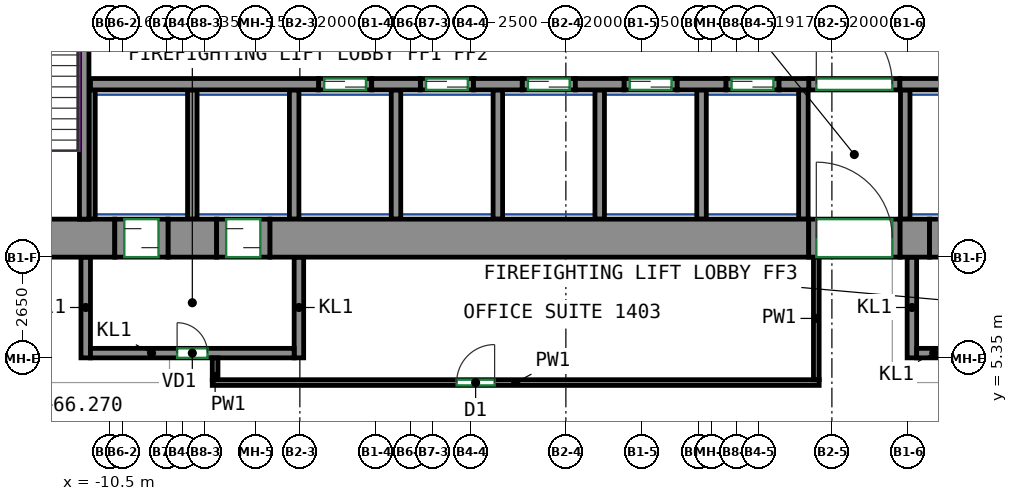
"""IFC4 building model, lengths in metres.
Left out: names, types, materials, properties, quantities, classifications, styles, units other than length and angle.
Written with IfcOpenShell. Run it as: python <this file> out.ifc"""

import sys

from ifc_helpers import new_model, si_unit, direction, frame, frame_2d, origin, place, context, subcontext, project, spatial, rectangle, extrude, source, transform, mapped, element, fill, save


model = new_model("IFC4")
c1 = context("Model", 3, precision=1e-05, world=origin(), true_north=direction((0.0, 1.0)))
c2 = subcontext(c1, "Body", "Model", "MODEL_VIEW")
j1 = project(units=[si_unit("LENGTHUNIT", "METRE"), si_unit("PLANEANGLEUNIT", "RADIAN")], contexts=[c1])
p1 = place(None, origin())
s1 = spatial("IfcSite", under=j1, at=p1, CompositionType="ELEMENT")
p2 = place(p1, origin())
s2 = spatial("IfcBuilding", under=s1, at=p2, CompositionType="ELEMENT")
p3 = place(p2, frame((0.0, 0.0, 63.2)))
s3 = spatial("IfcBuildingStorey", under=s2, at=p3, CompositionType="ELEMENT", Elevation=63.2)
m1 = source(origin(), c2, "Body", "SweptSolid", [
    extrude(rectangle(XDim=5.63, YDim=1.0, at=frame_2d((2.815, 0.0))), origin(), (0.0, 0.0, 1.0), 3.72),
])
p4 = place(p3, frame((-16.0, 8.5, 0.0), z_axis=(0.0, 0.0, 1.0), x_axis=(1.0, 0.0, 0.0)))
e1 = element("IfcWall", 1, at=p4, inside=s3, PredefinedType="SHEAR", context=c2, shape_type="MappedRepresentation", body=[
    mapped(m1, transform((0.0, 0.0, 0.0))),
])
p5 = place(p4, frame((2.25, 0.0, 0.0)))
e2 = element("IfcOpeningElement", 2, at=p5, cuts=e1, PredefinedType="OPENING", context=c2, shape_type="SweptSolid", body=[
    extrude(rectangle(XDim=1.2, YDim=2.1, at=frame_2d((0.6, 1.05))), frame((0.0, 0.51, 0.0), z_axis=(0.0, -1.0, 0.0), x_axis=(1.0, 0.0, 0.0)), (0.0, 0.0, 1.0), 1.02),
])
m2 = source(origin(), c2, "Body", "SweptSolid", [
    extrude(rectangle(XDim=1.28, YDim=1.0, at=frame_2d((0.64, 0.0))), origin(), (0.0, 0.0, 1.0), 3.72),
])
p6 = place(p3, frame((-8.97, 8.5, 0.0), z_axis=(0.0, 0.0, 1.0), x_axis=(1.0, 0.0, 0.0)))
e3 = element("IfcWall", 3, at=p6, inside=s3, PredefinedType="SHEAR", context=c2, shape_type="MappedRepresentation", body=[
    mapped(m2, transform((0.0, 0.0, 0.0))),
])
m3 = source(origin(), c2, "Body", "SweptSolid", [
    extrude(rectangle(XDim=14.18, YDim=1.0, at=frame_2d((7.09, 0.0))), origin(), (0.0, 0.0, 1.0), 3.72),
])
p7 = place(p3, frame((-6.29, 8.5, 0.0), z_axis=(0.0, 0.0, 1.0), x_axis=(1.0, 0.0, 0.0)))
e4 = element("IfcWall", 4, at=p7, inside=s3, PredefinedType="SHEAR", context=c2, shape_type="MappedRepresentation", body=[
    mapped(m3, transform((0.0, 0.0, 0.0))),
])
m4 = source(origin(), c2, "Body", "SweptSolid", [
    extrude(rectangle(XDim=0.78, YDim=1.0, at=frame_2d((0.39, 0.0))), origin(), (0.0, 0.0, 1.0), 3.72),
])
p8 = place(p3, frame((10.29, 8.5, 0.0), z_axis=(0.0, 0.0, 1.0), x_axis=(1.0, 0.0, 0.0)))
e5 = element("IfcWall", 5, at=p8, inside=s3, PredefinedType="SHEAR", context=c2, shape_type="MappedRepresentation", body=[
    mapped(m4, transform((0.0, 0.0, 0.0))),
])
m5 = source(origin(), c2, "Body", "SweptSolid", [
    extrude(rectangle(XDim=7.75, YDim=0.25, at=frame_2d((3.875, 0.0))), origin(), (0.0, 0.0, 1.0), 3.72),
])
p9 = place(p3, frame((-11.175, 9.0, 0.0), z_axis=(0.0, 0.0, 1.0), x_axis=(0.0, 1.0, 0.0)))
e6 = element("IfcWall", 6, at=p9, inside=s3, PredefinedType="SHEAR", context=c2, shape_type="MappedRepresentation", body=[
    mapped(m5, transform((0.0, 0.0, 0.0))),
])
m6 = source(origin(), c2, "Body", "SweptSolid", [
    extrude(rectangle(XDim=6.0, YDim=0.3, at=frame_2d((3.0, 0.0))), origin(), (0.0, 0.0, 1.0), 3.72),
])
p10 = place(p3, frame((-11.01, 12.55, 0.0), z_axis=(0.0, 0.0, 1.0), x_axis=(1.0, 0.0, 0.0)))
e7 = element("IfcWall", 7, at=p10, inside=s3, PredefinedType="SHEAR", context=c2, shape_type="MappedRepresentation", body=[
    mapped(m6, transform((0.0, 0.0, 0.0))),
])
m7 = source(origin(), c2, "Body", "SweptSolid", [
    extrude(rectangle(XDim=1.28, YDim=0.3, at=frame_2d((0.64, 0.0))), origin(), (0.0, 0.0, 1.0), 3.72),
])
for number, where, z_axis, x_axis in (
    (8, (-3.61, 12.55, 0.0), (0.0, 0.0, 1.0), (1.0, 0.0, 0.0)),
    (9, (-0.93, 12.55, 0.0), (0.0, 0.0, 1.0), (1.0, 0.0, 0.0)),
    (10, (1.75, 12.55, 0.0), (0.0, 0.0, 1.0), (1.0, 0.0, 0.0)),
    (11, (4.43, 12.55, 0.0), (0.0, 0.0, 1.0), (1.0, 0.0, 0.0)),
):
    element("IfcWall", number, at=place(p3, frame(where, z_axis=z_axis, x_axis=x_axis)), inside=s3, PredefinedType="SHEAR", context=c2, shape_type="MappedRepresentation", body=[
        mapped(m7, transform((0.0, 0.0, 0.0))),
    ])
m8 = source(origin(), c2, "Body", "SweptSolid", [
    extrude(rectangle(XDim=0.78, YDim=0.3, at=frame_2d((0.39, 0.0))), origin(), (0.0, 0.0, 1.0), 3.72),
])
p11 = place(p3, frame((7.11, 12.55, 0.0), z_axis=(0.0, 0.0, 1.0), x_axis=(1.0, 0.0, 0.0)))
e12 = element("IfcWall", 12, at=p11, inside=s3, PredefinedType="SHEAR", context=c2, shape_type="MappedRepresentation", body=[
    mapped(m8, transform((0.0, 0.0, 0.0))),
])
m9 = source(origin(), c2, "Body", "SweptSolid", [
    extrude(rectangle(XDim=2.82, YDim=0.3, at=frame_2d((1.41, 0.0))), origin(), (0.0, 0.0, 1.0), 3.72),
])
p12 = place(p3, frame((10.29, 12.55, 0.0), z_axis=(0.0, 0.0, 1.0), x_axis=(1.0, 0.0, 0.0)))
e13 = element("IfcWall", 13, at=p12, inside=s3, PredefinedType="SHEAR", context=c2, shape_type="MappedRepresentation", body=[
    mapped(m9, transform((0.0, 0.0, 0.0))),
])
m10 = source(origin(), c2, "Body", "SweptSolid", [
    extrude(rectangle(XDim=1.4, YDim=0.3, at=frame_2d((0.7, 0.0))), origin(), (0.0, 0.0, 1.0), 3.72),
])
p13 = place(p3, frame((-5.01, 12.55, 0.0), z_axis=(0.0, 0.0, 1.0), x_axis=(1.0, 0.0, 0.0)))
e14 = element("IfcWall", 14, at=p13, inside=s3, PredefinedType="PARTITIONING", context=c2, shape_type="MappedRepresentation", body=[
    mapped(m10, transform((0.0, 0.0, 0.0))),
])
p14 = place(p13, frame((0.15, 0.0, 0.0)))
e15 = element("IfcOpeningElement", 15, at=p14, cuts=e14, PredefinedType="OPENING", context=c2, shape_type="SweptSolid", body=[
    extrude(rectangle(XDim=1.1, YDim=2.1, at=frame_2d((0.55, 1.05))), frame((0.0, 0.16, 0.0), z_axis=(0.0, -1.0, 0.0), x_axis=(1.0, 0.0, 0.0)), (0.0, 0.0, 1.0), 0.32),
])
m11 = source(origin(), c2, "Body", "SweptSolid", [
    extrude(rectangle(XDim=1.4, YDim=0.3, at=frame_2d((0.7, 0.0))), origin(), (0.0, 0.0, 1.0), 3.72),
])
p15 = place(p3, frame((-2.33, 12.55, 0.0), z_axis=(0.0, 0.0, 1.0), x_axis=(1.0, 0.0, 0.0)))
e16 = element("IfcWall", 16, at=p15, inside=s3, PredefinedType="PARTITIONING", context=c2, shape_type="MappedRepresentation", body=[
    mapped(m11, transform((0.0, 0.0, 0.0))),
])
p16 = place(p15, frame((0.15, 0.0, 0.0)))
e17 = element("IfcOpeningElement", 17, at=p16, cuts=e16, PredefinedType="OPENING", context=c2, shape_type="SweptSolid", body=[
    extrude(rectangle(XDim=1.1, YDim=2.1, at=frame_2d((0.55, 1.05))), frame((0.0, 0.16, 0.0), z_axis=(0.0, -1.0, 0.0), x_axis=(1.0, 0.0, 0.0)), (0.0, 0.0, 1.0), 0.32),
])
p17 = place(p3, frame((0.35, 12.55, 0.0), z_axis=(0.0, 0.0, 1.0), x_axis=(1.0, 0.0, 0.0)))
e18 = element("IfcWall", 18, at=p17, inside=s3, PredefinedType="PARTITIONING", context=c2, shape_type="MappedRepresentation", body=[
    mapped(m10, transform((0.0, 0.0, 0.0))),
])
p18 = place(p17, frame((0.15, 0.0, 0.0)))
e19 = element("IfcOpeningElement", 19, at=p18, cuts=e18, PredefinedType="OPENING", context=c2, shape_type="SweptSolid", body=[
    extrude(rectangle(XDim=1.1, YDim=2.1, at=frame_2d((0.55, 1.05))), frame((0.0, 0.16, 0.0), z_axis=(0.0, -1.0, 0.0), x_axis=(1.0, 0.0, 0.0)), (0.0, 0.0, 1.0), 0.32),
])
p19 = place(p3, frame((3.03, 12.55, 0.0), z_axis=(0.0, 0.0, 1.0), x_axis=(1.0, 0.0, 0.0)))
e20 = element("IfcWall", 20, at=p19, inside=s3, PredefinedType="PARTITIONING", context=c2, shape_type="MappedRepresentation", body=[
    mapped(m10, transform((0.0, 0.0, 0.0))),
])
p20 = place(p19, frame((0.15, 0.0, 0.0)))
e21 = element("IfcOpeningElement", 21, at=p20, cuts=e20, PredefinedType="OPENING", context=c2, shape_type="SweptSolid", body=[
    extrude(rectangle(XDim=1.1, YDim=2.1, at=frame_2d((0.55, 1.05))), frame((0.0, 0.16, 0.0), z_axis=(0.0, -1.0, 0.0), x_axis=(1.0, 0.0, 0.0)), (0.0, 0.0, 1.0), 0.32),
])
p21 = place(p3, frame((5.71, 12.55, 0.0), z_axis=(0.0, 0.0, 1.0), x_axis=(1.0, 0.0, 0.0)))
e22 = element("IfcWall", 22, at=p21, inside=s3, PredefinedType="PARTITIONING", context=c2, shape_type="MappedRepresentation", body=[
    mapped(m11, transform((0.0, 0.0, 0.0))),
])
p22 = place(p21, frame((0.15, 0.0, 0.0)))
e23 = element("IfcOpeningElement", 23, at=p22, cuts=e22, PredefinedType="OPENING", context=c2, shape_type="SweptSolid", body=[
    extrude(rectangle(XDim=1.1, YDim=2.1, at=frame_2d((0.55, 1.05))), frame((0.0, 0.16, 0.0), z_axis=(0.0, -1.0, 0.0), x_axis=(1.0, 0.0, 0.0)), (0.0, 0.0, 1.0), 0.32),
])
m12 = source(origin(), c2, "Body", "SweptSolid", [
    extrude(rectangle(XDim=2.4, YDim=0.3, at=frame_2d((1.2, 0.0))), origin(), (0.0, 0.0, 1.0), 3.72),
])
p23 = place(p3, frame((7.89, 12.55, 0.0), z_axis=(0.0, 0.0, 1.0), x_axis=(1.0, 0.0, 0.0)))
e24 = element("IfcWall", 24, at=p23, inside=s3, PredefinedType="PARTITIONING", context=c2, shape_type="MappedRepresentation", body=[
    mapped(m12, transform((0.0, 0.0, 0.0))),
])
p24 = place(p23, frame((0.2, 0.0, 0.0)))
e25 = element("IfcOpeningElement", 25, at=p24, cuts=e24, PredefinedType="OPENING", context=c2, shape_type="SweptSolid", body=[
    extrude(rectangle(XDim=2.0, YDim=2.1, at=frame_2d((1.0, 1.05))), frame((0.0, 0.16, 0.0), z_axis=(0.0, -1.0, 0.0), x_axis=(1.0, 0.0, 0.0)), (0.0, 0.0, 1.0), 0.32),
])
m13 = source(origin(), c2, "Body", "SweptSolid", [
    extrude(rectangle(XDim=2.65, YDim=0.25, at=frame_2d((1.325, 0.0))), origin(), (0.0, 0.0, 1.0), 3.72),
])
for number, where, z_axis, x_axis in (
    (26, (-11.135, 5.35, 0.0), (0.0, 0.0, 1.0), (0.0, 1.0, 0.0)),
    (27, (-5.525, 5.35, 0.0), (0.0, 0.0, 1.0), (0.0, 1.0, 0.0)),
):
    element("IfcWall", number, at=place(p3, frame(where, z_axis=z_axis, x_axis=x_axis)), inside=s3, PredefinedType="PARTITIONING", context=c2, shape_type="MappedRepresentation", body=[
        mapped(m13, transform((0.0, 0.0, 0.0))),
    ])
m14 = source(origin(), c2, "Body", "SweptSolid", [
    extrude(rectangle(XDim=5.36, YDim=0.25, at=frame_2d((2.68, 0.0))), origin(), (0.0, 0.0, 1.0), 3.72),
])
p25 = place(p3, frame((-11.01, 5.475, 0.0), z_axis=(0.0, 0.0, 1.0), x_axis=(1.0, 0.0, 0.0)))
e28 = element("IfcWall", 28, at=p25, inside=s3, PredefinedType="PARTITIONING", context=c2, shape_type="MappedRepresentation", body=[
    mapped(m14, transform((0.0, 0.0, 0.0))),
])
p26 = place(p25, frame((2.28, 0.0, 0.0)))
e29 = element("IfcOpeningElement", 29, at=p26, cuts=e28, PredefinedType="OPENING", context=c2, shape_type="SweptSolid", body=[
    extrude(rectangle(XDim=0.8, YDim=2.0, at=frame_2d((0.4, 1.0))), frame((0.0, 0.135, 0.0), z_axis=(0.0, -1.0, 0.0), x_axis=(1.0, 0.0, 0.0)), (0.0, 0.0, 1.0), 0.27),
])
p27 = place(p3, frame((10.605, 5.35, 0.0), z_axis=(0.0, 0.0, 1.0), x_axis=(0.0, 1.0, 0.0)))
e30 = element("IfcWall", 30, at=p27, inside=s3, PredefinedType="PARTITIONING", context=c2, shape_type="MappedRepresentation", body=[
    mapped(m13, transform((0.0, 0.0, 0.0))),
])
m15 = source(origin(), c2, "Body", "SweptSolid", [
    extrude(rectangle(XDim=3.0, YDim=0.25, at=frame_2d((1.5, 0.0))), origin(), (0.0, 0.0, 1.0), 3.72),
])
p28 = place(p3, frame((10.73, 5.475, 0.0), z_axis=(0.0, 0.0, 1.0), x_axis=(1.0, 0.0, 0.0)))
e31 = element("IfcWall", 31, at=p28, inside=s3, PredefinedType="PARTITIONING", context=c2, shape_type="MappedRepresentation", body=[
    mapped(m15, transform((0.0, 0.0, 0.0))),
])
p29 = place(p28, frame((1.1, 0.0, 0.0)))
e32 = element("IfcOpeningElement", 32, at=p29, cuts=e31, PredefinedType="OPENING", context=c2, shape_type="SweptSolid", body=[
    extrude(rectangle(XDim=0.8, YDim=2.0, at=frame_2d((0.4, 1.0))), frame((0.0, 0.135, 0.0), z_axis=(0.0, -1.0, 0.0), x_axis=(1.0, 0.0, 0.0)), (0.0, 0.0, 1.0), 0.27),
])
m16 = source(origin(), c2, "Body", "SweptSolid", [
    extrude(rectangle(XDim=3.4, YDim=0.25, at=frame_2d((1.7, 0.0))), origin(), (0.0, 0.0, 1.0), 3.72),
])
for number, where, z_axis, x_axis in (
    (33, (10.43, 9.0, 0.0), (0.0, 0.0, 1.0), (0.0, 1.0, 0.0)),
    (34, (2.39, 9.0, 0.0), (0.0, 0.0, 1.0), (0.0, 1.0, 0.0)),
    (35, (5.07, 9.0, 0.0), (0.0, 0.0, 1.0), (0.0, 1.0, 0.0)),
    (36, (7.75, 9.0, 0.0), (0.0, 0.0, 1.0), (0.0, 1.0, 0.0)),
    (37, (-0.29, 9.0, 0.0), (0.0, 0.0, 1.0), (0.0, 1.0, 0.0)),
):
    element("IfcWall", number, at=place(p3, frame(where, z_axis=z_axis, x_axis=x_axis)), inside=s3, PredefinedType="PARTITIONING", context=c2, shape_type="MappedRepresentation", body=[
        mapped(m16, transform((0.0, 0.0, 0.0))),
    ])
m17 = source(origin(), c2, "Body", "SweptSolid", [
    extrude(rectangle(XDim=3.4, YDim=0.165, at=frame_2d((1.7, 0.0))), origin(), (0.0, 0.0, 1.0), 3.72),
])
p30 = place(p3, frame((-10.968, 9.0, 0.0), z_axis=(0.0, 0.0, 1.0), x_axis=(0.0, 1.0, 0.0)))
e38 = element("IfcWall", 38, at=p30, inside=s3, PredefinedType="PARTITIONING", context=c2, shape_type="MappedRepresentation", body=[
    mapped(m17, transform((0.0, 0.0, 0.0))),
])
for number, where, z_axis, x_axis in (
    (39, (-2.97, 9.0, 0.0), (0.0, 0.0, 1.0), (0.0, 1.0, 0.0)),
    (40, (-5.65, 9.0, 0.0), (0.0, 0.0, 1.0), (0.0, 1.0, 0.0)),
    (41, (-8.33, 9.0, 0.0), (0.0, 0.0, 1.0), (0.0, 1.0, 0.0)),
):
    element("IfcWall", number, at=place(p3, frame(where, z_axis=z_axis, x_axis=x_axis)), inside=s3, PredefinedType="PARTITIONING", context=c2, shape_type="MappedRepresentation", body=[
        mapped(m16, transform((0.0, 0.0, 0.0))),
    ])
m18 = source(origin(), c2, "Body", "SweptSolid", [
    extrude(rectangle(XDim=1.4, YDim=1.0, at=frame_2d((0.7, 0.0))), origin(), (0.0, 0.0, 1.0), 2.7),
])
p31 = place(p3, frame((-10.37, 8.5, 0.0), z_axis=(0.0, 0.0, 1.0), x_axis=(1.0, 0.0, 0.0)))
e42 = element("IfcWall", 42, at=p31, inside=s3, PredefinedType="PARTITIONING", context=c2, shape_type="MappedRepresentation", body=[
    mapped(m18, transform((0.0, 0.0, 0.0))),
])
p32 = place(p31, frame((0.25, 0.0, 0.0)))
e43 = element("IfcOpeningElement", 43, at=p32, cuts=e42, PredefinedType="OPENING", context=c2, shape_type="SweptSolid", body=[
    extrude(rectangle(XDim=0.9, YDim=2.1, at=frame_2d((0.45, 1.05))), frame((0.0, 0.51, 0.0), z_axis=(0.0, -1.0, 0.0), x_axis=(1.0, 0.0, 0.0)), (0.0, 0.0, 1.0), 1.02),
])
m19 = source(origin(), c2, "Body", "SweptSolid", [
    extrude(rectangle(XDim=1.4, YDim=1.0, at=frame_2d((0.7, 0.0))), origin(), (0.0, 0.0, 1.0), 2.7),
])
p33 = place(p3, frame((-7.69, 8.5, 0.0), z_axis=(0.0, 0.0, 1.0), x_axis=(1.0, 0.0, 0.0)))
e44 = element("IfcWall", 44, at=p33, inside=s3, PredefinedType="PARTITIONING", context=c2, shape_type="MappedRepresentation", body=[
    mapped(m19, transform((0.0, 0.0, 0.0))),
])
p34 = place(p33, frame((0.25, 0.0, 0.0)))
e45 = element("IfcOpeningElement", 45, at=p34, cuts=e44, PredefinedType="OPENING", context=c2, shape_type="SweptSolid", body=[
    extrude(rectangle(XDim=0.9, YDim=2.1, at=frame_2d((0.45, 1.05))), frame((0.0, 0.51, 0.0), z_axis=(0.0, -1.0, 0.0), x_axis=(1.0, 0.0, 0.0)), (0.0, 0.0, 1.0), 1.02),
])
m20 = source(origin(), c2, "Body", "SweptSolid", [
    extrude(rectangle(XDim=2.4, YDim=1.0, at=frame_2d((1.2, 0.0))), origin(), (0.0, 0.0, 1.0), 2.7),
])
p35 = place(p3, frame((7.89, 8.5, 0.0), z_axis=(0.0, 0.0, 1.0), x_axis=(1.0, 0.0, 0.0)))
e46 = element("IfcWall", 46, at=p35, inside=s3, PredefinedType="PARTITIONING", context=c2, shape_type="MappedRepresentation", body=[
    mapped(m20, transform((0.0, 0.0, 0.0))),
])
p36 = place(p35, frame((0.2, 0.0, 0.0)))
e47 = element("IfcOpeningElement", 47, at=p36, cuts=e46, PredefinedType="OPENING", context=c2, shape_type="SweptSolid", body=[
    extrude(rectangle(XDim=2.0, YDim=2.1, at=frame_2d((1.0, 1.05))), frame((0.0, 0.51, 0.0), z_axis=(0.0, -1.0, 0.0), x_axis=(1.0, 0.0, 0.0)), (0.0, 0.0, 1.0), 1.02),
])
p37 = place(p3, frame((11.07, 8.5, 0.0), z_axis=(0.0, 0.0, 1.0), x_axis=(1.0, 0.0, 0.0)))
e48 = element("IfcWall", 48, at=p37, inside=s3, PredefinedType="PARTITIONING", context=c2, shape_type="MappedRepresentation", body=[
    mapped(m19, transform((0.0, 0.0, 0.0))),
])
p38 = place(p37, frame((0.25, 0.0, 0.0)))
e49 = element("IfcOpeningElement", 49, at=p38, cuts=e48, PredefinedType="OPENING", context=c2, shape_type="SweptSolid", body=[
    extrude(rectangle(XDim=0.9, YDim=2.1, at=frame_2d((0.45, 1.05))), frame((0.0, 0.51, 0.0), z_axis=(0.0, -1.0, 0.0), x_axis=(1.0, 0.0, 0.0)), (0.0, 0.0, 1.0), 1.02),
])
p39 = place(p3, frame((-7.73, 4.775, 0.0), z_axis=(0.0, 0.0, 1.0), x_axis=(0.0, 1.0, 0.0)))
e50 = element("IfcWall", 50, at=p39, inside=s3, PredefinedType="PARTITIONING", context=c2, shape_type="SweptSolid", body=[
    extrude(rectangle(XDim=0.575, YDim=0.15, at=frame_2d((0.288, 0.0))), origin(), (0.0, 0.0, 1.0), 3.72),
])
p40 = place(p3, frame((-7.805, 4.7, 0.0), z_axis=(0.0, 0.0, 1.0), x_axis=(1.0, 0.0, 0.0)))
e51 = element("IfcWall", 51, at=p40, inside=s3, PredefinedType="PARTITIONING", context=c2, shape_type="SweptSolid", body=[
    extrude(rectangle(XDim=15.97, YDim=0.15, at=frame_2d((7.985, 0.0))), origin(), (0.0, 0.0, 1.0), 3.72),
])
p41 = place(p40, frame((6.43, 0.0, 0.0)))
e52 = element("IfcOpeningElement", 52, at=p41, cuts=e51, PredefinedType="OPENING", context=c2, shape_type="SweptSolid", body=[
    extrude(rectangle(XDim=1.0, YDim=2.1, at=frame_2d((0.5, 1.05))), frame((0.0, 0.085, 0.0), z_axis=(0.0, -1.0, 0.0), x_axis=(1.0, 0.0, 0.0)), (0.0, 0.0, 1.0), 0.17),
])
p42 = place(p3, frame((8.09, 8.0, 0.0), z_axis=(0.0, 0.0, 1.0), x_axis=(0.0, -1.0, 0.0)))
e53 = element("IfcWall", 53, at=p42, inside=s3, PredefinedType="PARTITIONING", context=c2, shape_type="SweptSolid", body=[
    extrude(rectangle(XDim=3.225, YDim=0.15, at=frame_2d((1.613, 0.0))), origin(), (0.0, 0.0, 1.0), 3.72),
])
p43 = place(p24, origin())
e54 = element("IfcDoor", 54, at=p43, inside=s3, OperationType="DOUBLE_DOOR_SINGLE_SWING", PredefinedType="DOOR", context=c2, shape_type="SweptSolid", body=[
    extrude(rectangle(XDim=2.0, YDim=2.1, at=frame_2d((1.0, 1.05))), frame((0.0, 0.025, 0.0), z_axis=(0.0, -1.0, 0.0), x_axis=(1.0, 0.0, 0.0)), (0.0, 0.0, 1.0), 0.05),
])
fill(e25, e54)
p44 = place(p36, origin())
e55 = element("IfcDoor", 55, at=p44, inside=s3, OperationType="DOUBLE_DOOR_SINGLE_SWING", PredefinedType="DOOR", context=c2, shape_type="SweptSolid", body=[
    extrude(rectangle(XDim=2.0, YDim=2.1, at=frame_2d((1.0, 1.05))), frame((0.0, 0.405, 0.0), z_axis=(0.0, -1.0, 0.0), x_axis=(1.0, 0.0, 0.0)), (0.0, 0.0, 1.0), 0.05),
])
fill(e47, e55)
p45 = place(p26, origin())
e56 = element("IfcDoor", 56, at=p45, inside=s3, OperationType="SINGLE_SWING_LEFT", PredefinedType="DOOR", context=c2, shape_type="SweptSolid", body=[
    extrude(rectangle(XDim=0.8, YDim=2.0, at=frame_2d((0.4, 1.0))), frame((0.0, 0.025, 0.0), z_axis=(0.0, -1.0, 0.0), x_axis=(1.0, 0.0, 0.0)), (0.0, 0.0, 1.0), 0.05),
])
fill(e29, e56)
p46 = place(p32, origin())
e57 = element("IfcDoor", 57, at=p46, inside=s3, OperationType="SLIDING_TO_LEFT", PredefinedType="DOOR", context=c2, shape_type="SweptSolid", body=[
    extrude(rectangle(XDim=0.9, YDim=2.1, at=frame_2d((0.45, 1.05))), frame((0.0, 0.405, 0.0), z_axis=(0.0, -1.0, 0.0), x_axis=(1.0, 0.0, 0.0)), (0.0, 0.0, 1.0), 0.05),
])
fill(e43, e57)
p47 = place(p34, origin())
e58 = element("IfcDoor", 58, at=p47, inside=s3, OperationType="SLIDING_TO_RIGHT", PredefinedType="DOOR", context=c2, shape_type="SweptSolid", body=[
    extrude(rectangle(XDim=0.9, YDim=2.1, at=frame_2d((0.45, 1.05))), frame((0.0, 0.405, 0.0), z_axis=(0.0, -1.0, 0.0), x_axis=(1.0, 0.0, 0.0)), (0.0, 0.0, 1.0), 0.05),
])
fill(e45, e58)
p48 = place(p14, origin())
e59 = element("IfcDoor", 59, at=p48, inside=s3, OperationType="DOUBLE_DOOR_SLIDING", PredefinedType="DOOR", context=c2, shape_type="SweptSolid", body=[
    extrude(rectangle(XDim=1.1, YDim=2.1, at=frame_2d((0.55, 1.05))), frame((0.0, 0.025, 0.0), z_axis=(0.0, -1.0, 0.0), x_axis=(1.0, 0.0, 0.0)), (0.0, 0.0, 1.0), 0.05),
])
fill(e15, e59)
p49 = place(p16, origin())
e60 = element("IfcDoor", 60, at=p49, inside=s3, OperationType="DOUBLE_DOOR_SLIDING", PredefinedType="DOOR", context=c2, shape_type="SweptSolid", body=[
    extrude(rectangle(XDim=1.1, YDim=2.1, at=frame_2d((0.55, 1.05))), frame((0.0, 0.025, 0.0), z_axis=(0.0, -1.0, 0.0), x_axis=(1.0, 0.0, 0.0)), (0.0, 0.0, 1.0), 0.05),
])
fill(e17, e60)
p50 = place(p18, origin())
e61 = element("IfcDoor", 61, at=p50, inside=s3, OperationType="DOUBLE_DOOR_SLIDING", PredefinedType="DOOR", context=c2, shape_type="SweptSolid", body=[
    extrude(rectangle(XDim=1.1, YDim=2.1, at=frame_2d((0.55, 1.05))), frame((0.0, 0.025, 0.0), z_axis=(0.0, -1.0, 0.0), x_axis=(1.0, 0.0, 0.0)), (0.0, 0.0, 1.0), 0.05),
])
fill(e19, e61)
p51 = place(p20, origin())
e62 = element("IfcDoor", 62, at=p51, inside=s3, OperationType="DOUBLE_DOOR_SLIDING", PredefinedType="DOOR", context=c2, shape_type="SweptSolid", body=[
    extrude(rectangle(XDim=1.1, YDim=2.1, at=frame_2d((0.55, 1.05))), frame((0.0, 0.025, 0.0), z_axis=(0.0, -1.0, 0.0), x_axis=(1.0, 0.0, 0.0)), (0.0, 0.0, 1.0), 0.05),
])
fill(e21, e62)
p52 = place(p22, origin())
e63 = element("IfcDoor", 63, at=p52, inside=s3, OperationType="DOUBLE_DOOR_SLIDING", PredefinedType="DOOR", context=c2, shape_type="SweptSolid", body=[
    extrude(rectangle(XDim=1.1, YDim=2.1, at=frame_2d((0.55, 1.05))), frame((0.0, 0.025, 0.0), z_axis=(0.0, -1.0, 0.0), x_axis=(1.0, 0.0, 0.0)), (0.0, 0.0, 1.0), 0.05),
])
fill(e23, e63)
p53 = place(p41, origin())
e64 = element("IfcDoor", 64, at=p53, inside=s3, OperationType="SINGLE_SWING_RIGHT", PredefinedType="DOOR", context=c2, shape_type="SweptSolid", body=[
    extrude(rectangle(XDim=1.0, YDim=2.1, at=frame_2d((0.5, 1.05))), frame((0.0, 0.025, 0.0), z_axis=(0.0, -1.0, 0.0), x_axis=(1.0, 0.0, 0.0)), (0.0, 0.0, 1.0), 0.05),
])
fill(e52, e64)
save(model, sys.argv[1])
